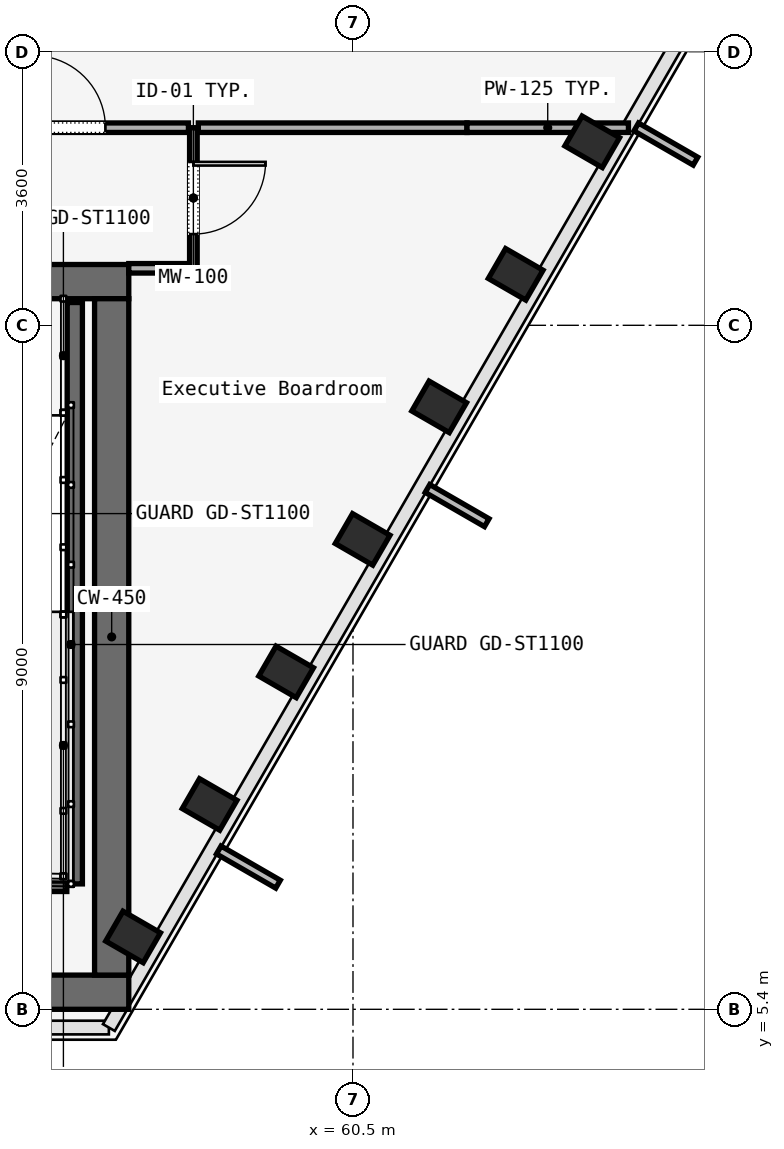
"""IFC4 building model, lengths in metres.
Left out: names, types, materials, properties, quantities, classifications, styles, units other than length and angle.
Written with IfcOpenShell. Run it as: python <this file> out.ifc"""

import sys

from ifc_helpers import new_model, si_unit, direction, frame, frame_2d, origin, origin_2d, place, context, subcontext, project, spatial, rectangle, i_section, extrude, element, fill, save


model = new_model("IFC4")
c1 = context("Model", 3, precision=1e-05, world=origin(), true_north=direction((0.0, 1.0)))
c2 = subcontext(c1, "Body", "Model", "MODEL_VIEW")
j1 = project(units=[si_unit("LENGTHUNIT", "METRE"), si_unit("PLANEANGLEUNIT", "RADIAN")], contexts=[c1])
p1 = place(None, origin())
s1 = spatial("IfcSite", under=j1, at=p1, CompositionType="ELEMENT")
p2 = place(p1, origin())
s2 = spatial("IfcBuilding", under=s1, at=p2, CompositionType="ELEMENT")
p3 = place(p2, frame((0.0, 0.0, 39.8)))
s3 = spatial("IfcBuildingStorey", under=s2, at=p3, CompositionType="ELEMENT", Elevation=39.8)
p4 = place(p3, frame((26.45, 14.975, 0.0), z_axis=(0.0, 0.0, 1.0), x_axis=(1.0, 0.0, 0.0)))
e1 = element("IfcWall", 1, at=p4, inside=s3, PredefinedType="SOLIDWALL", context=c2, shape_type="SweptSolid", body=[
    extrude(rectangle(XDim=31.1, YDim=0.45, at=frame_2d((15.55, 0.0))), origin(), (0.0, 0.0, 1.0), 3.58),
])
p5 = place(p4, frame((1.65, 0.0, 0.0)))
e2 = element("IfcOpeningElement", 2, at=p5, cuts=e1, PredefinedType="OPENING", context=c2, shape_type="SweptSolid", body=[
    extrude(rectangle(XDim=1.1, YDim=2.2, at=frame_2d((0.55, 1.1))), frame((0.0, 0.225, 0.0), z_axis=(0.0, -1.0, 0.0), x_axis=(1.0, 0.0, 0.0)), (0.0, 0.0, 1.0), 0.45),
])
p6 = place(p4, frame((13.65, 0.0, 0.0)))
e3 = element("IfcOpeningElement", 3, at=p6, cuts=e1, PredefinedType="OPENING", context=c2, shape_type="SweptSolid", body=[
    extrude(rectangle(XDim=1.1, YDim=2.2, at=frame_2d((0.55, 1.1))), frame((0.0, 0.225, 0.0), z_axis=(0.0, -1.0, 0.0), x_axis=(1.0, 0.0, 0.0)), (0.0, 0.0, 1.0), 0.45),
])
p7 = place(p4, frame((25.55, 0.0, 0.0)))
e4 = element("IfcOpeningElement", 4, at=p7, cuts=e1, PredefinedType="OPENING", context=c2, shape_type="SweptSolid", body=[
    extrude(rectangle(XDim=1.1, YDim=2.2, at=frame_2d((0.55, 1.1))), frame((0.0, 0.225, 0.0), z_axis=(0.0, -1.0, 0.0), x_axis=(1.0, 0.0, 0.0)), (0.0, 0.0, 1.0), 0.45),
])
p8 = place(p4, frame((10.7, 0.0, 0.0)))
e5 = element("IfcOpeningElement", 5, at=p8, cuts=e1, PredefinedType="OPENING", context=c2, shape_type="SweptSolid", body=[
    extrude(rectangle(XDim=1.4, YDim=2.2, at=frame_2d((0.7, 1.1))), frame((0.0, 0.225, 0.0), z_axis=(0.0, -1.0, 0.0), x_axis=(1.0, 0.0, 0.0)), (0.0, 0.0, 1.0), 0.45),
])
p9 = place(p4, frame((19.35, 0.0, 0.0)))
e6 = element("IfcOpeningElement", 6, at=p9, cuts=e1, PredefinedType="OPENING", context=c2, shape_type="SweptSolid", body=[
    extrude(rectangle(XDim=1.1, YDim=2.2, at=frame_2d((0.55, 1.1))), frame((0.0, 0.225, 0.0), z_axis=(0.0, -1.0, 0.0), x_axis=(1.0, 0.0, 0.0)), (0.0, 0.0, 1.0), 0.45),
])
p10 = place(p4, frame((21.4, 0.0, 0.0)))
e7 = element("IfcOpeningElement", 7, at=p10, cuts=e1, PredefinedType="OPENING", context=c2, shape_type="SweptSolid", body=[
    extrude(rectangle(XDim=0.9, YDim=2.1, at=frame_2d((0.45, 1.05))), frame((0.0, 0.225, 0.0), z_axis=(0.0, -1.0, 0.0), x_axis=(1.0, 0.0, 0.0)), (0.0, 0.0, 1.0), 0.45),
])
p11 = place(p4, frame((23.35, 0.0, 0.0)))
e8 = element("IfcOpeningElement", 8, at=p11, cuts=e1, PredefinedType="OPENING", context=c2, shape_type="SweptSolid", body=[
    extrude(rectangle(XDim=1.3, YDim=2.3, at=frame_2d((0.65, 1.15))), frame((0.0, 0.225, 0.0), z_axis=(0.0, -1.0, 0.0), x_axis=(1.0, 0.0, 0.0)), (0.0, 0.0, 1.0), 0.45),
])
p12 = place(p3, frame((26.45, 5.625, 0.0), z_axis=(0.0, 0.0, 1.0), x_axis=(1.0, 0.0, 0.0)))
e9 = element("IfcWall", 9, at=p12, inside=s3, PredefinedType="SOLIDWALL", context=c2, shape_type="SweptSolid", body=[
    extrude(rectangle(XDim=31.1, YDim=0.45, at=frame_2d((15.55, 0.0))), origin(), (0.0, 0.0, 1.0), 3.58),
])
p13 = place(p3, frame((57.325, 5.85, 0.0), z_axis=(0.0, 0.0, 1.0), x_axis=(0.0, 1.0, 0.0)))
e10 = element("IfcWall", 10, at=p13, inside=s3, PredefinedType="SOLIDWALL", context=c2, shape_type="SweptSolid", body=[
    extrude(rectangle(XDim=8.9, YDim=0.45, at=frame_2d((4.45, 0.0))), origin(), (0.0, 0.0, 1.0), 3.58),
])
for number, where, z_axis, x_axis in (
    (11, (57.607, 6.352, 0.0), (0.0, 0.0, 1.0), (0.5, 0.866, 0.0)),
    (12, (58.614, 8.096, 0.0), (0.0, 0.0, 1.0), (0.5, 0.866, 0.0)),
    (13, (59.62, 9.839, 0.0), (0.0, 0.0, 1.0), (0.5, 0.866, 0.0)),
    (14, (60.627, 11.583, 0.0), (0.0, 0.0, 1.0), (0.5, 0.866, 0.0)),
    (15, (61.634, 13.327, 0.0), (0.0, 0.0, 1.0), (0.5, 0.866, 0.0)),
    (16, (62.641, 15.071, 0.0), (0.0, 0.0, 1.0), (0.5, 0.866, 0.0)),
    (17, (63.647, 16.814, 0.0), (0.0, 0.0, 1.0), (0.5, 0.866, 0.0)),
):
    element("IfcColumn", number, at=place(p3, frame(where, z_axis=z_axis, x_axis=x_axis)), inside=s3, PredefinedType="COLUMN", context=c2, shape_type="SweptSolid", body=[
        extrude(i_section(OverallWidth=0.454, OverallDepth=0.569, WebThickness=0.078, FlangeThickness=0.08, FilletRadius=0.015, at=origin_2d()), origin(), (0.0, 0.0, 1.0), 3.58),
    ])
p14 = place(p3, frame((56.84, 14.7, 0.0), z_axis=(0.0, 0.0, 1.0), x_axis=(0.0, -1.0, 0.0)))
e18 = element("IfcWall", 18, at=p14, inside=s3, PredefinedType="SOLIDWALL", context=c2, shape_type="SweptSolid", body=[
    extrude(rectangle(XDim=7.65, YDim=0.2, at=frame_2d((3.825, 0.0))), origin(), (0.0, 0.0, 1.0), 3.8),
])
p15 = place(p3, frame((53.62, 7.05, 0.0), z_axis=(0.0, 0.0, 1.0), x_axis=(1.0, 0.0, 0.0)))
e19 = element("IfcWall", 19, at=p15, inside=s3, PredefinedType="SOLIDWALL", context=c2, shape_type="SweptSolid", body=[
    extrude(rectangle(XDim=3.115, YDim=0.2, at=frame_2d((1.558, 0.0))), origin(), (0.0, 0.0, 1.0), 3.8),
])
p16 = place(p3, frame((58.4, 17.0, 0.0), z_axis=(0.0, 0.0, 1.0), x_axis=(0.0, -1.0, 0.0)))
e20 = element("IfcWall", 20, at=p16, inside=s3, PredefinedType="MOVABLE", context=c2, shape_type="SweptSolid", body=[
    extrude(rectangle(XDim=1.85, YDim=0.1, at=frame_2d((0.925, 0.0))), origin(), (0.0, 0.0, 1.0), 2.933),
])
p17 = place(p16, frame((0.45, 0.0, 0.0)))
e21 = element("IfcOpeningElement", 21, at=p17, cuts=e20, PredefinedType="OPENING", context=c2, shape_type="SweptSolid", body=[
    extrude(rectangle(XDim=0.95, YDim=2.2, at=frame_2d((0.475, 1.1))), frame((0.0, 0.05, 0.0), z_axis=(0.0, -1.0, 0.0), x_axis=(1.0, 0.0, 0.0)), (0.0, 0.0, 1.0), 0.1),
])
p18 = place(p3, frame((58.335, 15.15, 0.0), z_axis=(0.0, 0.0, 1.0), x_axis=(-1.0, 0.0, 0.0)))
e22 = element("IfcWall", 22, at=p18, inside=s3, PredefinedType="PARTITIONING", context=c2, shape_type="SweptSolid", body=[
    extrude(rectangle(XDim=0.785, YDim=0.125, at=frame_2d((0.393, 0.0))), origin(), (0.0, 0.0, 1.0), 2.933),
])
p19 = place(p3, frame((55.2, 17.0, 0.0), z_axis=(0.0, 0.0, 1.0), x_axis=(1.0, 0.0, 0.0)))
e23 = element("IfcWall", 23, at=p19, inside=s3, PredefinedType="PARTITIONING", context=c2, shape_type="SweptSolid", body=[
    extrude(rectangle(XDim=3.135, YDim=0.125, at=frame_2d((1.567, 0.0))), origin(), (0.0, 0.0, 1.0), 2.933),
])
p20 = place(p19, frame((1.093, 0.0, 0.0)))
e24 = element("IfcOpeningElement", 24, at=p20, cuts=e23, PredefinedType="OPENING", context=c2, shape_type="SweptSolid", body=[
    extrude(rectangle(XDim=0.95, YDim=2.2, at=frame_2d((0.475, 1.1))), frame((0.0, 0.062, 0.0), z_axis=(0.0, -1.0, 0.0), x_axis=(1.0, 0.0, 0.0)), (0.0, 0.0, 1.0), 0.125),
])
p21 = place(p3, frame((58.465, 17.0, 0.0), z_axis=(0.0, 0.0, 1.0), x_axis=(1.0, 0.0, 0.0)))
e25 = element("IfcWall", 25, at=p21, inside=s3, PredefinedType="PARTITIONING", context=c2, shape_type="SweptSolid", body=[
    extrude(rectangle(XDim=3.535, YDim=0.125, at=frame_2d((1.768, 0.0))), origin(), (0.0, 0.0, 1.0), 2.933),
])
p22 = place(p3, frame((62.0, 17.0, 0.0), z_axis=(0.0, 0.0, 1.0), x_axis=(1.0, 0.0, 0.0)))
e26 = element("IfcWall", 26, at=p22, inside=s3, PredefinedType="PARTITIONING", context=c2, shape_type="SweptSolid", body=[
    extrude(rectangle(XDim=2.124, YDim=0.125, at=frame_2d((1.062, 0.0))), origin(), (0.0, 0.0, 1.0), 2.933),
])
p23 = place(p17, origin())
e27 = element("IfcDoor", 27, at=p23, inside=s3, OperationType="SINGLE_SWING_LEFT", PredefinedType="DOOR", context=c2, shape_type="SweptSolid", body=[
    extrude(rectangle(XDim=0.95, YDim=2.2, at=frame_2d((0.475, 1.1))), frame((0.0, 0.025, 0.0), z_axis=(0.0, -1.0, 0.0), x_axis=(1.0, 0.0, 0.0)), (0.0, 0.0, 1.0), 0.05),
])
fill(e21, e27)
p24 = place(p20, origin())
e28 = element("IfcDoor", 28, at=p24, inside=s3, OperationType="SINGLE_SWING_RIGHT", PredefinedType="DOOR", context=c2, shape_type="SweptSolid", body=[
    extrude(rectangle(XDim=0.95, YDim=2.2, at=frame_2d((0.475, 1.1))), frame((0.0, 0.025, 0.0), z_axis=(0.0, -1.0, 0.0), x_axis=(1.0, 0.0, 0.0)), (0.0, 0.0, 1.0), 0.05),
])
fill(e24, e28)
save(model, sys.argv[1])
